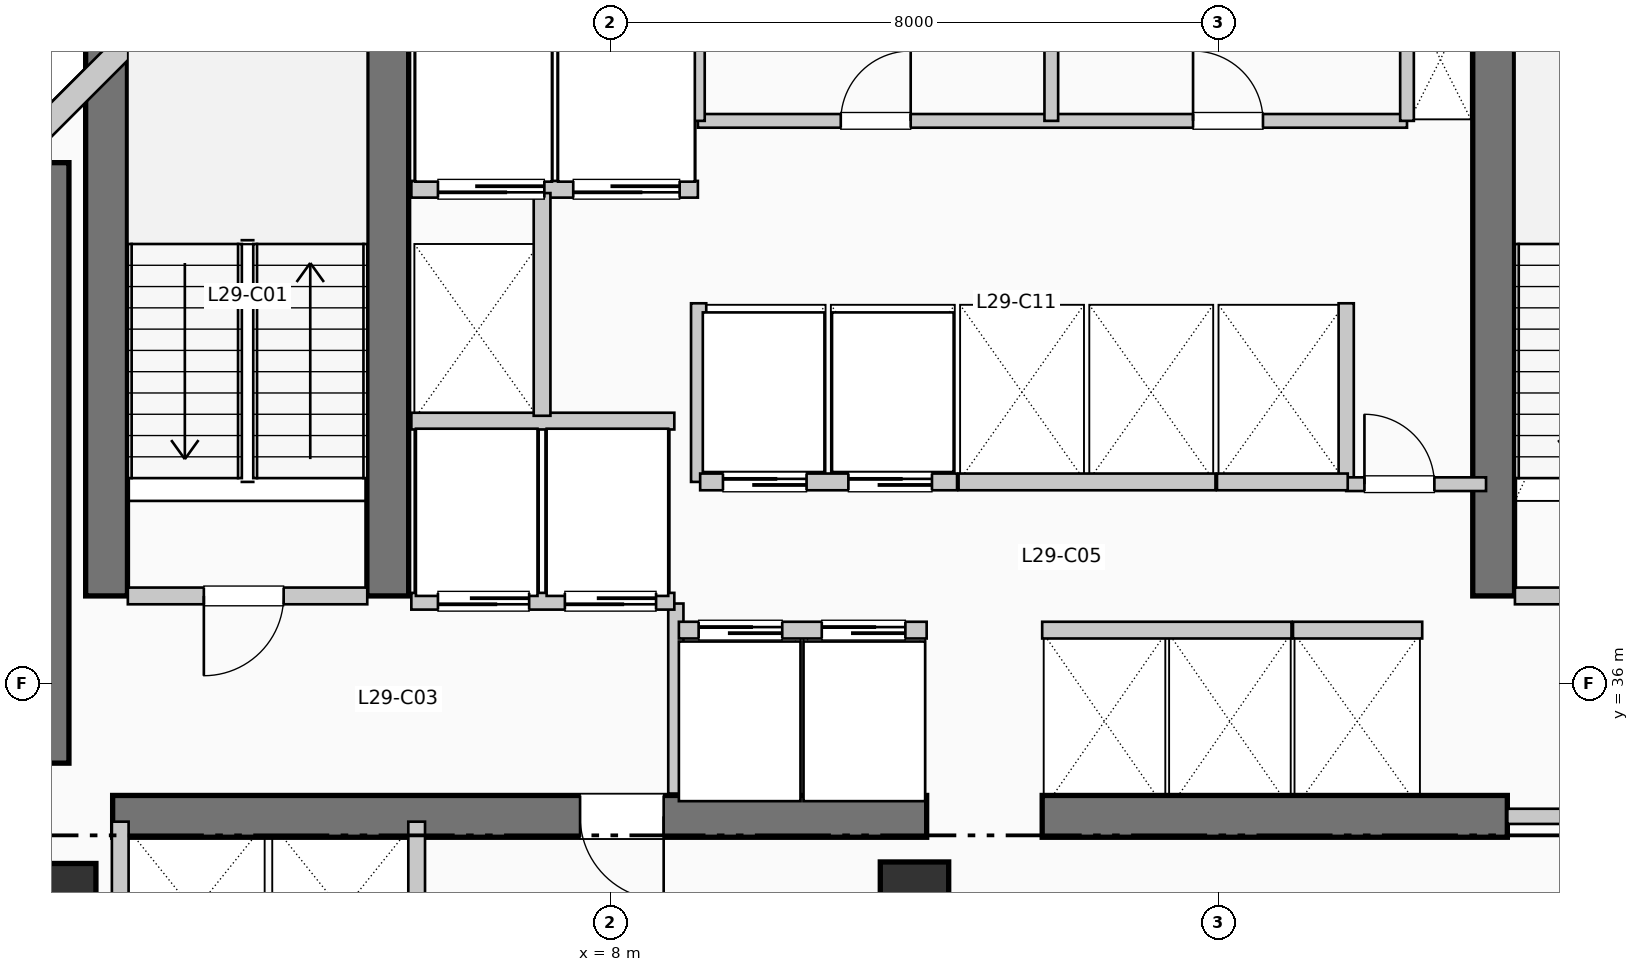
"""IFC4 building model, lengths in metres.
Left out: names, types, materials, properties, quantities, classifications, styles, units other than length and angle.
Written with IfcOpenShell. Run it as: python <this file> out.ifc"""

import sys

from ifc_helpers import new_model, si_unit, direction, frame, frame_2d, origin, origin_2d, place, context, subcontext, project, spatial, rectangle, extrude, element, fill, save


model = new_model("IFC4")
c1 = context("Model", 3, precision=1e-05, world=origin(), true_north=direction((0.0, 1.0)))
c2 = subcontext(c1, "Body", "Model", "MODEL_VIEW")
j1 = project(units=[si_unit("LENGTHUNIT", "METRE"), si_unit("PLANEANGLEUNIT", "RADIAN")], contexts=[c1])
p1 = place(None, origin())
s1 = spatial("IfcSite", under=j1, at=p1, CompositionType="ELEMENT")
p2 = place(p1, origin())
s2 = spatial("IfcBuilding", under=s1, at=p2, CompositionType="ELEMENT")
p3 = place(p2, frame((0.0, 0.0, 122.43)))
s3 = spatial("IfcBuildingStorey", under=s2, at=p3, CompositionType="ELEMENT", Elevation=122.43)
p4 = place(p3, frame((0.5, 34.95, 0.0), z_axis=(0.0, 0.0, 1.0), x_axis=(0.0, 1.0, 0.0)))
e1 = element("IfcWall", 1, at=p4, inside=s3, PredefinedType="SHEAR", context=c2, shape_type="SweptSolid", body=[
    extrude(rectangle(XDim=7.9, YDim=0.75, at=frame_2d((3.95, 0.0))), origin(), (0.0, 0.0, 1.0), 3.96),
])
p5 = place(p3, frame((1.45, 34.25, 0.0), z_axis=(0.0, 0.0, 1.0), x_axis=(1.0, 0.0, 0.0)))
e2 = element("IfcWall", 2, at=p5, inside=s3, PredefinedType="SHEAR", context=c2, shape_type="SweptSolid", body=[
    extrude(rectangle(XDim=10.71, YDim=0.55, at=frame_2d((5.355, 0.0))), origin(), (0.0, 0.0, 1.0), 3.96),
])
p6 = place(p5, frame((7.25, 0.0, 0.0), z_axis=(0.0, 0.0, 1.0), x_axis=(-1.0, 0.0, 0.0)))
e3 = element("IfcOpeningElement", 3, at=p6, cuts=e2, PredefinedType="OPENING", context=c2, shape_type="SweptSolid", body=[
    extrude(rectangle(XDim=1.1, YDim=2.15, at=frame_2d((0.55, 1.075))), frame((0.0, 0.285, 0.0), z_axis=(0.0, -1.0, 0.0), x_axis=(1.0, 0.0, 0.0)), (0.0, 0.0, 1.0), 0.57),
])
p7 = place(p3, frame((13.68, 34.25, 0.0), z_axis=(0.0, 0.0, 1.0), x_axis=(1.0, 0.0, 0.0)))
e4 = element("IfcWall", 4, at=p7, inside=s3, PredefinedType="SHEAR", context=c2, shape_type="SweptSolid", body=[
    extrude(rectangle(XDim=6.12, YDim=0.55, at=frame_2d((3.06, 0.0))), origin(), (0.0, 0.0, 1.0), 3.96),
])
for number, where, z_axis, x_axis in (
    (5, (1.37, 37.15, 0.0), (0.0, 0.0, 1.0), (0.0, 1.0, 0.0)),
    (6, (5.07, 37.15, 0.0), (0.0, 0.0, 1.0), (0.0, 1.0, 0.0)),
    (7, (19.62, 37.15, 0.0), (0.0, 0.0, 1.0), (0.0, 1.0, 0.0)),
):
    element("IfcWall", number, at=place(p3, frame(where, z_axis=z_axis, x_axis=x_axis)), inside=s3, PredefinedType="SHEAR", context=c2, shape_type="SweptSolid", body=[
        extrude(rectangle(XDim=7.89, YDim=0.55, at=frame_2d((3.945, 0.0))), origin(), (0.0, 0.0, 1.0), 3.96),
    ])
p8 = place(p3, frame((0.8, 33.2, 0.0), z_axis=(0.0, 0.0, 1.0), x_axis=(1.0, 0.0, 0.0)))
e8 = element("IfcColumn", 8, at=p8, inside=s3, PredefinedType="COLUMN", context=c2, shape_type="SweptSolid", body=[
    extrude(rectangle(XDim=0.86, YDim=0.86, at=origin_2d()), origin(), (0.0, 0.0, 1.0), 3.96),
])
p9 = place(p3, frame((12.0, 33.2, 0.0), z_axis=(0.0, 0.0, 1.0), x_axis=(1.0, 0.0, 0.0)))
e9 = element("IfcColumn", 9, at=p9, inside=s3, PredefinedType="COLUMN", context=c2, shape_type="SweptSolid", body=[
    extrude(rectangle(XDim=0.9, YDim=0.9, at=origin_2d()), origin(), (0.0, 0.0, 1.0), 3.96),
])
p10 = place(p3, frame((3.074, 45.848, 0.0), z_axis=(0.0, 0.0, 1.0), x_axis=(-0.707106781187, -0.707106781187, 0.0)))
e10 = element("IfcWall", 10, at=p10, inside=s3, PredefinedType="SOLIDWALL", context=c2, shape_type="SweptSolid", body=[
    extrude(rectangle(XDim=4.133, YDim=0.32, at=frame_2d((2.066, 0.0))), origin(), (0.0, 0.0, 1.0), 3.71),
])
p11 = place(p3, frame((1.65, 37.15, 0.0), z_axis=(0.0, 0.0, 1.0), x_axis=(1.0, 0.0, 0.0)))
e11 = element("IfcWall", 11, at=p11, inside=s3, PredefinedType="PARTITIONING", context=c2, shape_type="SweptSolid", body=[
    extrude(rectangle(XDim=3.15, YDim=0.22, at=frame_2d((1.575, 0.0))), origin(), (0.0, 0.0, 1.0), 3.71),
])
p12 = place(p11, frame((2.05, 0.0, 0.0), z_axis=(0.0, 0.0, 1.0), x_axis=(-1.0, 0.0, 0.0)))
e12 = element("IfcOpeningElement", 12, at=p12, cuts=e11, PredefinedType="OPENING", context=c2, shape_type="SweptSolid", body=[
    extrude(rectangle(XDim=1.05, YDim=2.15, at=frame_2d((0.525, 1.075))), frame((0.0, 0.12, 0.0), z_axis=(0.0, -1.0, 0.0), x_axis=(1.0, 0.0, 0.0)), (0.0, 0.0, 1.0), 0.24),
])
p13 = place(p3, frame((8.86, 34.55, 0.0), z_axis=(0.0, 0.0, 1.0), x_axis=(0.0, 1.0, 0.0)))
e13 = element("IfcWall", 13, at=p13, inside=s3, PredefinedType="PARTITIONING", context=c2, shape_type="SweptSolid", body=[
    extrude(rectangle(XDim=2.5, YDim=0.2, at=frame_2d((1.25, 0.0))), origin(), (0.0, 0.0, 1.0), 3.71),
])
p14 = place(p3, frame((19.9, 37.15, 0.0), z_axis=(0.0, 0.0, 1.0), x_axis=(1.0, 0.0, 0.0)))
e14 = element("IfcWall", 14, at=p14, inside=s3, PredefinedType="PARTITIONING", context=c2, shape_type="SweptSolid", body=[
    extrude(rectangle(XDim=3.15, YDim=0.22, at=frame_2d((1.575, 0.0))), origin(), (0.0, 0.0, 1.0), 3.71),
])
p15 = place(p14, frame((2.05, 0.0, 0.0), z_axis=(0.0, 0.0, 1.0), x_axis=(-1.0, 0.0, 0.0)))
e15 = element("IfcOpeningElement", 15, at=p15, cuts=e14, PredefinedType="OPENING", context=c2, shape_type="SweptSolid", body=[
    extrude(rectangle(XDim=1.05, YDim=2.15, at=frame_2d((0.525, 1.075))), frame((0.0, 0.12, 0.0), z_axis=(0.0, -1.0, 0.0), x_axis=(1.0, 0.0, 0.0)), (0.0, 0.0, 1.0), 0.24),
])
p16 = place(p3, frame((19.8, 34.25, 0.0), z_axis=(0.0, 0.0, 1.0), x_axis=(1.0, 0.0, 0.0)))
e16 = element("IfcWall", 16, at=p16, inside=s3, PredefinedType="PARTITIONING", context=c2, shape_type="SweptSolid", body=[
    extrude(rectangle(XDim=3.25, YDim=0.2, at=frame_2d((1.625, 0.0))), origin(), (0.0, 0.0, 1.0), 3.71),
])
p17 = place(p16, frame((2.15, 0.0, 0.0), z_axis=(0.0, 0.0, 1.0), x_axis=(-1.0, 0.0, 0.0)))
e17 = element("IfcOpeningElement", 17, at=p17, cuts=e16, PredefinedType="OPENING", context=c2, shape_type="SweptSolid", body=[
    extrude(rectangle(XDim=1.1, YDim=2.15, at=frame_2d((0.55, 1.075))), frame((0.0, 0.11, 0.0), z_axis=(0.0, -1.0, 0.0), x_axis=(1.0, 0.0, 0.0)), (0.0, 0.0, 1.0), 0.22),
])
p18 = place(p3, frame((5.38, 37.08, 0.0), z_axis=(0.0, 0.0, 1.0), x_axis=(1.0, 0.0, 0.0)))
e18 = element("IfcWall", 18, at=p18, inside=s3, PredefinedType="PARTITIONING", context=c2, shape_type="SweptSolid", body=[
    extrude(rectangle(XDim=3.46, YDim=0.22, at=frame_2d((1.73, 0.0))), origin(), (0.0, 0.0, 1.0), 3.71),
])
p19 = place(p18, frame((1.55, 0.0, 0.0), z_axis=(0.0, 0.0, 1.0), x_axis=(-1.0, 0.0, 0.0)))
e19 = element("IfcOpeningElement", 19, at=p19, cuts=e18, PredefinedType="OPENING", context=c2, shape_type="SweptSolid", body=[
    extrude(rectangle(XDim=1.2, YDim=2.2, at=frame_2d((0.6, 1.1))), frame((0.0, 0.12, 0.0), z_axis=(0.0, -1.0, 0.0), x_axis=(1.0, 0.0, 0.0)), (0.0, 0.0, 1.0), 0.24),
])
p20 = place(p18, frame((3.22, 0.0, 0.0), z_axis=(0.0, 0.0, 1.0), x_axis=(-1.0, 0.0, 0.0)))
e20 = element("IfcOpeningElement", 20, at=p20, cuts=e18, PredefinedType="OPENING", context=c2, shape_type="SweptSolid", body=[
    extrude(rectangle(XDim=1.2, YDim=2.2, at=frame_2d((0.6, 1.1))), frame((0.0, 0.12, 0.0), z_axis=(0.0, -1.0, 0.0), x_axis=(1.0, 0.0, 0.0)), (0.0, 0.0, 1.0), 0.24),
])
p21 = place(p3, frame((5.38, 39.45, 0.0), z_axis=(0.0, 0.0, 1.0), x_axis=(1.0, 0.0, 0.0)))
e21 = element("IfcWall", 21, at=p21, inside=s3, PredefinedType="PARTITIONING", context=c2, shape_type="SweptSolid", body=[
    extrude(rectangle(XDim=3.46, YDim=0.22, at=frame_2d((1.73, 0.0))), origin(), (0.0, 0.0, 1.0), 3.71),
])
p22 = place(p3, frame((5.38, 42.5, 0.0), z_axis=(0.0, 0.0, 1.0), x_axis=(1.0, 0.0, 0.0)))
e22 = element("IfcWall", 22, at=p22, inside=s3, PredefinedType="PARTITIONING", context=c2, shape_type="SweptSolid", body=[
    extrude(rectangle(XDim=3.77, YDim=0.22, at=frame_2d((1.885, 0.0))), origin(), (0.0, 0.0, 1.0), 3.71),
])
p23 = place(p22, frame((1.75, 0.0, 0.0), z_axis=(0.0, 0.0, 1.0), x_axis=(-1.0, 0.0, 0.0)))
e23 = element("IfcOpeningElement", 23, at=p23, cuts=e22, PredefinedType="OPENING", context=c2, shape_type="SweptSolid", body=[
    extrude(rectangle(XDim=1.4, YDim=2.2, at=frame_2d((0.7, 1.1))), frame((0.0, 0.12, 0.0), z_axis=(0.0, -1.0, 0.0), x_axis=(1.0, 0.0, 0.0)), (0.0, 0.0, 1.0), 0.24),
])
p24 = place(p22, frame((3.53, 0.0, 0.0), z_axis=(0.0, 0.0, 1.0), x_axis=(-1.0, 0.0, 0.0)))
e24 = element("IfcOpeningElement", 24, at=p24, cuts=e22, PredefinedType="OPENING", context=c2, shape_type="SweptSolid", body=[
    extrude(rectangle(XDim=1.4, YDim=2.2, at=frame_2d((0.7, 1.1))), frame((0.0, 0.12, 0.0), z_axis=(0.0, -1.0, 0.0), x_axis=(1.0, 0.0, 0.0)), (0.0, 0.0, 1.0), 0.24),
])
p25 = place(p3, frame((7.1, 39.52, 0.0), z_axis=(0.0, 0.0, 1.0), x_axis=(0.0, 1.0, 0.0)))
e25 = element("IfcWall", 25, at=p25, inside=s3, PredefinedType="PARTITIONING", context=c2, shape_type="SweptSolid", body=[
    extrude(rectangle(XDim=2.93, YDim=0.22, at=frame_2d((1.465, 0.0))), origin(), (0.0, 0.0, 1.0), 3.71),
])
for number, where, z_axis, x_axis in (
    (26, (1.55, 31.8, 0.0), (0.0, 0.0, 1.0), (0.0, 1.0, 0.0)),
    (27, (5.45, 31.8, 0.0), (0.0, 0.0, 1.0), (0.0, 1.0, 0.0)),
):
    element("IfcWall", number, at=place(p3, frame(where, z_axis=z_axis, x_axis=x_axis)), inside=s3, PredefinedType="PARTITIONING", context=c2, shape_type="SweptSolid", body=[
        extrude(rectangle(XDim=2.38, YDim=0.22, at=frame_2d((1.19, 0.0))), origin(), (0.0, 0.0, 1.0), 3.71),
    ])
for number, where, z_axis, x_axis in (
    (28, (9.16, 38.65, 0.0), (0.0, 0.0, 1.0), (0.0, 1.0, 0.0)),
    (29, (17.68, 38.65, 0.0), (0.0, 0.0, 1.0), (0.0, 1.0, 0.0)),
):
    element("IfcWall", number, at=place(p3, frame(where, z_axis=z_axis, x_axis=x_axis)), inside=s3, PredefinedType="PARTITIONING", context=c2, shape_type="SweptSolid", body=[
        extrude(rectangle(XDim=2.35, YDim=0.2, at=frame_2d((1.175, 0.0))), origin(), (0.0, 0.0, 1.0), 3.71),
    ])
p26 = place(p3, frame((17.68, 38.62, 0.0), z_axis=(0.0, 0.0, 1.0), x_axis=(1.0, 0.0, 0.0)))
e30 = element("IfcWall", 30, at=p26, inside=s3, PredefinedType="PARTITIONING", context=c2, shape_type="SweptSolid", body=[
    extrude(rectangle(XDim=1.84, YDim=0.18, at=frame_2d((0.92, 0.0))), origin(), (0.0, 0.0, 1.0), 3.71),
])
p27 = place(p26, frame((0.24, 0.0, 0.0)))
e31 = element("IfcOpeningElement", 31, at=p27, cuts=e30, PredefinedType="OPENING", context=c2, shape_type="SweptSolid", body=[
    extrude(rectangle(XDim=0.92, YDim=2.1, at=frame_2d((0.46, 1.05))), frame((0.0, 0.1, 0.0), z_axis=(0.0, -1.0, 0.0), x_axis=(1.0, 0.0, 0.0)), (0.0, 0.0, 1.0), 0.2),
])
p28 = place(p3, frame((8.9, 36.7, 0.0), z_axis=(0.0, 0.0, 1.0), x_axis=(1.0, 0.0, 0.0)))
e32 = element("IfcWall", 32, at=p28, inside=s3, PredefinedType="PARTITIONING", context=c2, shape_type="SweptSolid", body=[
    extrude(rectangle(XDim=3.26, YDim=0.22, at=frame_2d((1.63, 0.0))), origin(), (0.0, 0.0, 1.0), 3.71),
])
p29 = place(p28, frame((0.26, 0.0, 0.0)))
e33 = element("IfcOpeningElement", 33, at=p29, cuts=e32, PredefinedType="OPENING", context=c2, shape_type="SweptSolid", body=[
    extrude(rectangle(XDim=1.1, YDim=2.2, at=frame_2d((0.55, 1.1))), frame((0.0, 0.12, 0.0), z_axis=(0.0, -1.0, 0.0), x_axis=(1.0, 0.0, 0.0)), (0.0, 0.0, 1.0), 0.24),
])
p30 = place(p28, frame((1.88, 0.0, 0.0)))
e34 = element("IfcOpeningElement", 34, at=p30, cuts=e32, PredefinedType="OPENING", context=c2, shape_type="SweptSolid", body=[
    extrude(rectangle(XDim=1.1, YDim=2.2, at=frame_2d((0.55, 1.1))), frame((0.0, 0.12, 0.0), z_axis=(0.0, -1.0, 0.0), x_axis=(1.0, 0.0, 0.0)), (0.0, 0.0, 1.0), 0.24),
])
p31 = place(p3, frame((9.18, 38.65, 0.0), z_axis=(0.0, 0.0, 1.0), x_axis=(1.0, 0.0, 0.0)))
e35 = element("IfcWall", 35, at=p31, inside=s3, PredefinedType="PARTITIONING", context=c2, shape_type="SweptSolid", body=[
    extrude(rectangle(XDim=3.38, YDim=0.22, at=frame_2d((1.69, 0.0))), origin(), (0.0, 0.0, 1.0), 3.71),
])
p32 = place(p31, frame((0.3, 0.0, 0.0)))
e36 = element("IfcOpeningElement", 36, at=p32, cuts=e35, PredefinedType="OPENING", context=c2, shape_type="SweptSolid", body=[
    extrude(rectangle(XDim=1.1, YDim=2.2, at=frame_2d((0.55, 1.1))), frame((0.0, 0.12, 0.0), z_axis=(0.0, -1.0, 0.0), x_axis=(1.0, 0.0, 0.0)), (0.0, 0.0, 1.0), 0.24),
])
p33 = place(p31, frame((1.95, 0.0, 0.0)))
e37 = element("IfcOpeningElement", 37, at=p33, cuts=e35, PredefinedType="OPENING", context=c2, shape_type="SweptSolid", body=[
    extrude(rectangle(XDim=1.1, YDim=2.2, at=frame_2d((0.55, 1.1))), frame((0.0, 0.12, 0.0), z_axis=(0.0, -1.0, 0.0), x_axis=(1.0, 0.0, 0.0)), (0.0, 0.0, 1.0), 0.24),
])
p34 = place(p3, frame((13.68, 36.7, 0.0), z_axis=(0.0, 0.0, 1.0), x_axis=(1.0, 0.0, 0.0)))
e38 = element("IfcWall", 38, at=p34, inside=s3, PredefinedType="PARTITIONING", context=c2, shape_type="SweptSolid", body=[
    extrude(rectangle(XDim=3.28, YDim=0.22, at=frame_2d((1.64, 0.0))), origin(), (0.0, 0.0, 1.0), 3.71),
])
p35 = place(p3, frame((12.58, 38.65, 0.0), z_axis=(0.0, 0.0, 1.0), x_axis=(1.0, 0.0, 0.0)))
e39 = element("IfcWall", 39, at=p35, inside=s3, PredefinedType="PARTITIONING", context=c2, shape_type="SweptSolid", body=[
    extrude(rectangle(XDim=3.38, YDim=0.22, at=frame_2d((1.69, 0.0))), origin(), (0.0, 0.0, 1.0), 3.71),
])
p36 = place(p3, frame((16.98, 36.7, 0.0), z_axis=(0.0, 0.0, 1.0), x_axis=(1.0, 0.0, 0.0)))
e40 = element("IfcWall", 40, at=p36, inside=s3, PredefinedType="PARTITIONING", context=c2, shape_type="SweptSolid", body=[
    extrude(rectangle(XDim=1.7, YDim=0.22, at=frame_2d((0.85, 0.0))), origin(), (0.0, 0.0, 1.0), 3.71),
])
p37 = place(p3, frame((15.98, 38.65, 0.0), z_axis=(0.0, 0.0, 1.0), x_axis=(1.0, 0.0, 0.0)))
e41 = element("IfcWall", 41, at=p37, inside=s3, PredefinedType="PARTITIONING", context=c2, shape_type="SweptSolid", body=[
    extrude(rectangle(XDim=1.72, YDim=0.22, at=frame_2d((0.86, 0.0))), origin(), (0.0, 0.0, 1.0), 3.71),
])
p38 = place(p3, frame((9.15, 43.4, 0.0), z_axis=(0.0, 0.0, 1.0), x_axis=(1.0, 0.0, 0.0)))
e42 = element("IfcWall", 42, at=p38, inside=s3, PredefinedType="PLUMBINGWALL", context=c2, shape_type="SweptSolid", body=[
    extrude(rectangle(XDim=9.33, YDim=0.18, at=frame_2d((4.665, 0.0))), origin(), (0.0, 0.0, 1.0), 3.71),
])
p39 = place(p38, frame((1.88, 0.0, 0.0)))
e43 = element("IfcOpeningElement", 43, at=p39, cuts=e42, PredefinedType="OPENING", context=c2, shape_type="SweptSolid", body=[
    extrude(rectangle(XDim=0.92, YDim=2.1, at=frame_2d((0.46, 1.05))), frame((0.0, 0.1, 0.0), z_axis=(0.0, -1.0, 0.0), x_axis=(1.0, 0.0, 0.0)), (0.0, 0.0, 1.0), 0.2),
])
p40 = place(p38, frame((6.515, 0.0, 0.0)))
e44 = element("IfcOpeningElement", 44, at=p40, cuts=e42, PredefinedType="OPENING", context=c2, shape_type="SweptSolid", body=[
    extrude(rectangle(XDim=0.92, YDim=2.1, at=frame_2d((0.46, 1.05))), frame((0.0, 0.1, 0.0), z_axis=(0.0, -1.0, 0.0), x_axis=(1.0, 0.0, 0.0)), (0.0, 0.0, 1.0), 0.2),
])
for number, where, z_axis, x_axis in (
    (45, (9.15, 43.4, 0.0), (0.0, 0.0, 1.0), (0.0, 1.0, 0.0)),
    (46, (18.48, 43.4, 0.0), (0.0, 0.0, 1.0), (0.0, 1.0, 0.0)),
    (47, (13.8, 43.4, 0.0), (0.0, 0.0, 1.0), (0.0, 1.0, 0.0)),
):
    element("IfcWall", number, at=place(p3, frame(where, z_axis=z_axis, x_axis=x_axis)), inside=s3, PredefinedType="PLUMBINGWALL", context=c2, shape_type="SweptSolid", body=[
        extrude(rectangle(XDim=1.88, YDim=0.18, at=frame_2d((0.94, 0.0))), origin(), (0.0, 0.0, 1.0), 3.71),
    ])
p41 = place(p12, origin())
e48 = element("IfcDoor", 48, at=p41, inside=s3, OperationType="SINGLE_SWING_LEFT", PredefinedType="DOOR", context=c2, shape_type="SweptSolid", body=[
    extrude(rectangle(XDim=1.05, YDim=2.15, at=frame_2d((0.525, 1.075))), frame((0.0, 0.025, 0.0), z_axis=(0.0, -1.0, 0.0), x_axis=(1.0, 0.0, 0.0)), (0.0, 0.0, 1.0), 0.05),
])
fill(e12, e48)
p42 = place(p6, origin())
e49 = element("IfcDoor", 49, at=p42, inside=s3, OperationType="SINGLE_SWING_RIGHT", PredefinedType="DOOR", context=c2, shape_type="SweptSolid", body=[
    extrude(rectangle(XDim=1.1, YDim=2.15, at=frame_2d((0.55, 1.075))), frame((0.0, 0.025, 0.0), z_axis=(0.0, -1.0, 0.0), x_axis=(1.0, 0.0, 0.0)), (0.0, 0.0, 1.0), 0.05),
])
fill(e3, e49)
p43 = place(p19, origin())
e50 = element("IfcDoor", 50, at=p43, inside=s3, OperationType="SLIDING_TO_RIGHT", PredefinedType="DOOR", context=c2, shape_type="SweptSolid", body=[
    extrude(rectangle(XDim=1.2, YDim=2.2, at=frame_2d((0.6, 1.1))), frame((0.0, 0.025, 0.0), z_axis=(0.0, -1.0, 0.0), x_axis=(1.0, 0.0, 0.0)), (0.0, 0.0, 1.0), 0.05),
])
fill(e19, e50)
p44 = place(p20, origin())
e51 = element("IfcDoor", 51, at=p44, inside=s3, OperationType="SLIDING_TO_RIGHT", PredefinedType="DOOR", context=c2, shape_type="SweptSolid", body=[
    extrude(rectangle(XDim=1.2, YDim=2.2, at=frame_2d((0.6, 1.1))), frame((0.0, 0.025, 0.0), z_axis=(0.0, -1.0, 0.0), x_axis=(1.0, 0.0, 0.0)), (0.0, 0.0, 1.0), 0.05),
])
fill(e20, e51)
p45 = place(p23, origin())
e52 = element("IfcDoor", 52, at=p45, inside=s3, OperationType="SLIDING_TO_LEFT", PredefinedType="DOOR", context=c2, shape_type="SweptSolid", body=[
    extrude(rectangle(XDim=1.4, YDim=2.2, at=frame_2d((0.7, 1.1))), frame((0.0, 0.025, 0.0), z_axis=(0.0, -1.0, 0.0), x_axis=(1.0, 0.0, 0.0)), (0.0, 0.0, 1.0), 0.05),
])
fill(e23, e52)
p46 = place(p24, origin())
e53 = element("IfcDoor", 53, at=p46, inside=s3, OperationType="SLIDING_TO_LEFT", PredefinedType="DOOR", context=c2, shape_type="SweptSolid", body=[
    extrude(rectangle(XDim=1.4, YDim=2.2, at=frame_2d((0.7, 1.1))), frame((0.0, 0.025, 0.0), z_axis=(0.0, -1.0, 0.0), x_axis=(1.0, 0.0, 0.0)), (0.0, 0.0, 1.0), 0.05),
])
fill(e24, e53)
p47 = place(p27, origin())
e54 = element("IfcDoor", 54, at=p47, inside=s3, OperationType="SINGLE_SWING_LEFT", PredefinedType="DOOR", context=c2, shape_type="SweptSolid", body=[
    extrude(rectangle(XDim=0.92, YDim=2.1, at=frame_2d((0.46, 1.05))), frame((0.0, 0.025, 0.0), z_axis=(0.0, -1.0, 0.0), x_axis=(1.0, 0.0, 0.0)), (0.0, 0.0, 1.0), 0.05),
])
fill(e31, e54)
p48 = place(p29, origin())
e55 = element("IfcDoor", 55, at=p48, inside=s3, OperationType="SLIDING_TO_LEFT", PredefinedType="DOOR", context=c2, shape_type="SweptSolid", body=[
    extrude(rectangle(XDim=1.1, YDim=2.2, at=frame_2d((0.55, 1.1))), frame((0.0, 0.025, 0.0), z_axis=(0.0, -1.0, 0.0), x_axis=(1.0, 0.0, 0.0)), (0.0, 0.0, 1.0), 0.05),
])
fill(e33, e55)
p49 = place(p30, origin())
e56 = element("IfcDoor", 56, at=p49, inside=s3, OperationType="SLIDING_TO_LEFT", PredefinedType="DOOR", context=c2, shape_type="SweptSolid", body=[
    extrude(rectangle(XDim=1.1, YDim=2.2, at=frame_2d((0.55, 1.1))), frame((0.0, 0.025, 0.0), z_axis=(0.0, -1.0, 0.0), x_axis=(1.0, 0.0, 0.0)), (0.0, 0.0, 1.0), 0.05),
])
fill(e34, e56)
p50 = place(p32, origin())
e57 = element("IfcDoor", 57, at=p50, inside=s3, OperationType="SLIDING_TO_LEFT", PredefinedType="DOOR", context=c2, shape_type="SweptSolid", body=[
    extrude(rectangle(XDim=1.1, YDim=2.2, at=frame_2d((0.55, 1.1))), frame((0.0, 0.025, 0.0), z_axis=(0.0, -1.0, 0.0), x_axis=(1.0, 0.0, 0.0)), (0.0, 0.0, 1.0), 0.05),
])
fill(e36, e57)
p51 = place(p33, origin())
e58 = element("IfcDoor", 58, at=p51, inside=s3, OperationType="SLIDING_TO_LEFT", PredefinedType="DOOR", context=c2, shape_type="SweptSolid", body=[
    extrude(rectangle(XDim=1.1, YDim=2.2, at=frame_2d((0.55, 1.1))), frame((0.0, 0.025, 0.0), z_axis=(0.0, -1.0, 0.0), x_axis=(1.0, 0.0, 0.0)), (0.0, 0.0, 1.0), 0.05),
])
fill(e37, e58)
p52 = place(p39, origin())
e59 = element("IfcDoor", 59, at=p52, inside=s3, OperationType="SINGLE_SWING_RIGHT", PredefinedType="DOOR", context=c2, shape_type="SweptSolid", body=[
    extrude(rectangle(XDim=0.92, YDim=2.1, at=frame_2d((0.46, 1.05))), frame((0.0, 0.025, 0.0), z_axis=(0.0, -1.0, 0.0), x_axis=(1.0, 0.0, 0.0)), (0.0, 0.0, 1.0), 0.05),
])
fill(e43, e59)
p53 = place(p40, origin())
e60 = element("IfcDoor", 60, at=p53, inside=s3, OperationType="SINGLE_SWING_LEFT", PredefinedType="DOOR", context=c2, shape_type="SweptSolid", body=[
    extrude(rectangle(XDim=0.92, YDim=2.1, at=frame_2d((0.46, 1.05))), frame((0.0, 0.025, 0.0), z_axis=(0.0, -1.0, 0.0), x_axis=(1.0, 0.0, 0.0)), (0.0, 0.0, 1.0), 0.05),
])
fill(e44, e60)
save(model, sys.argv[1])
